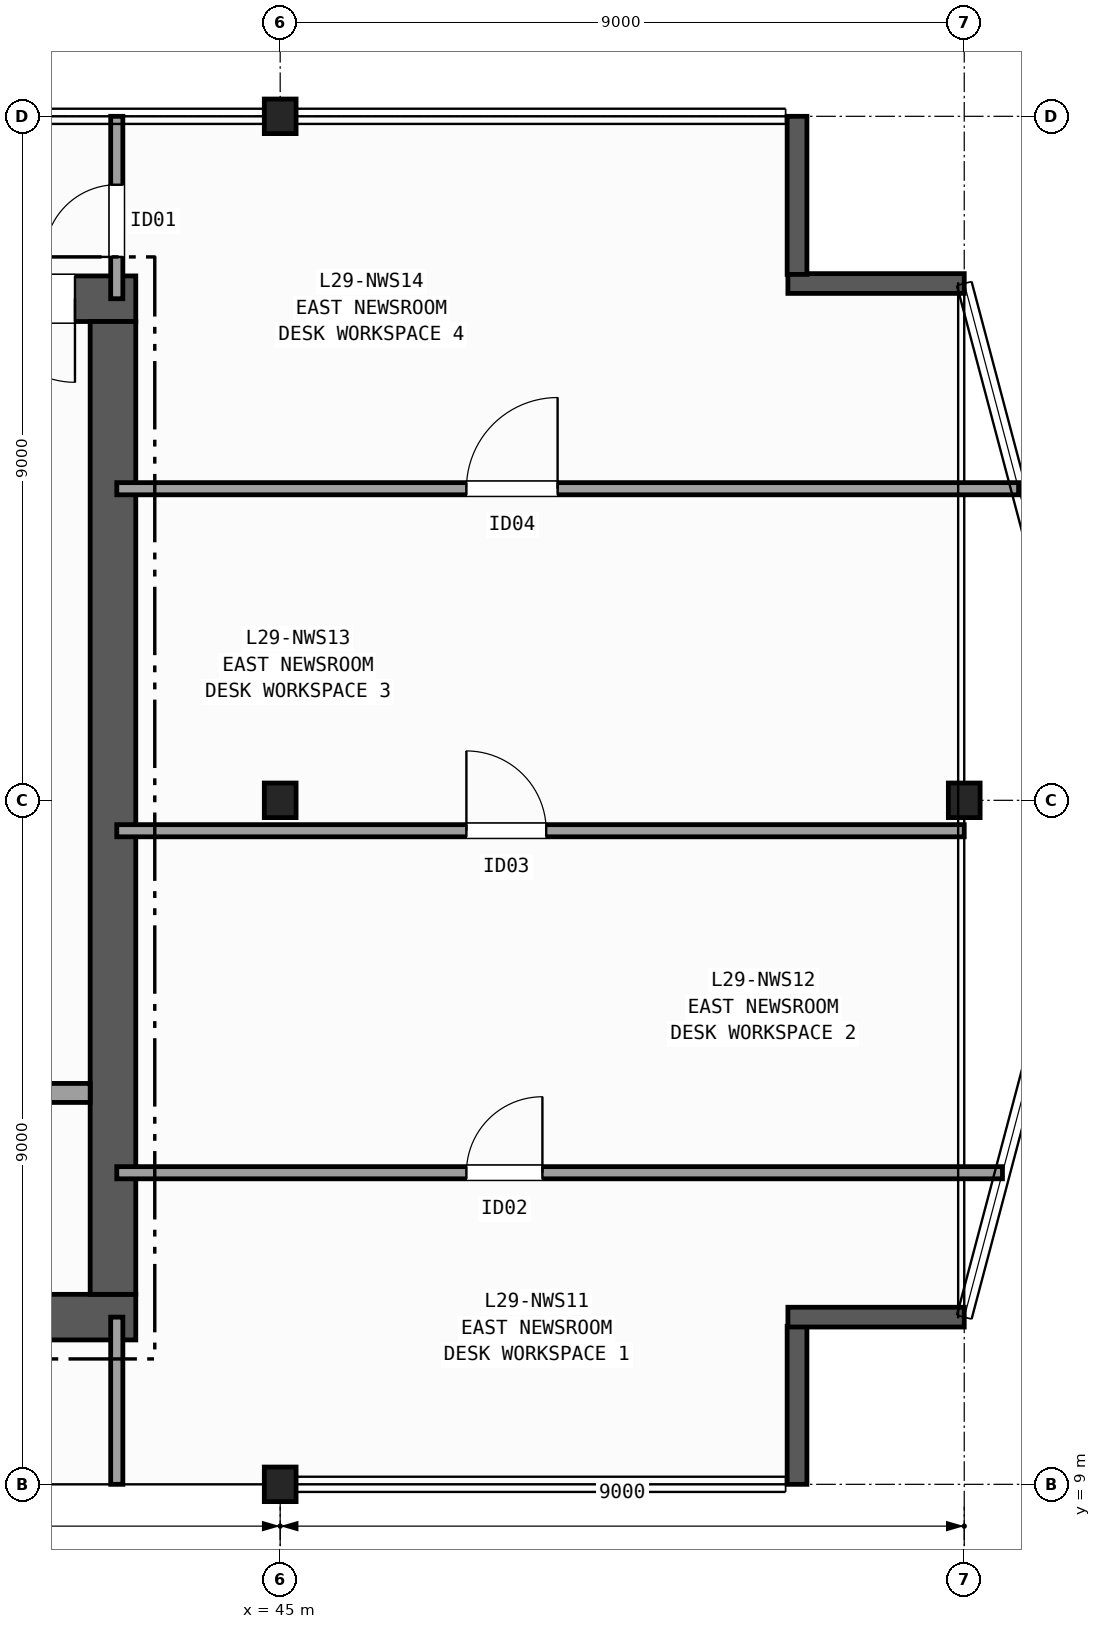
"""IFC4 building model, lengths in metres.
Left out: names, types, materials, properties, quantities, classifications, styles, units other than length and angle.
Written with IfcOpenShell. Run it as: python <this file> out.ifc"""

import sys

from ifc_helpers import new_model, si_unit, direction, frame, frame_2d, origin, origin_2d, place, context, subcontext, project, spatial, rectangle, i_section, extrude, element, fill, save


model = new_model("IFC4")
c1 = context("Model", 3, precision=1e-05, world=origin(), true_north=direction((0.0, 1.0)))
c2 = subcontext(c1, "Body", "Model", "MODEL_VIEW")
j1 = project(units=[si_unit("LENGTHUNIT", "METRE"), si_unit("PLANEANGLEUNIT", "RADIAN")], contexts=[c1])
p1 = place(None, origin())
s1 = spatial("IfcSite", under=j1, at=p1, CompositionType="ELEMENT")
p2 = place(p1, origin())
s2 = spatial("IfcBuilding", under=s1, at=p2, CompositionType="ELEMENT")
p3 = place(p2, frame((0.0, 0.0, 121.1)))
s3 = spatial("IfcBuildingStorey", under=s2, at=p3, CompositionType="ELEMENT", Elevation=121.1)
for number, where, z_axis, x_axis in (
    (1, (45.0, 9.0, 0.0), (0.0, 0.0, 1.0), (1.0, 0.0, 0.0)),
    (2, (45.0, 18.0, 0.0), (0.0, 0.0, 1.0), (1.0, 0.0, 0.0)),
    (3, (45.0, 27.0, 0.0), (0.0, 0.0, 1.0), (1.0, 0.0, 0.0)),
    (4, (54.0, 18.0, 0.0), (0.0, 0.0, 1.0), (1.0, 0.0, 0.0)),
):
    element("IfcColumn", number, at=place(p3, frame(where, z_axis=z_axis, x_axis=x_axis)), inside=s3, PredefinedType="COLUMN", context=c2, shape_type="SweptSolid", body=[
        extrude(i_section(OverallWidth=0.418, OverallDepth=0.455, WebThickness=0.042, FlangeThickness=0.068, FilletRadius=0.015, at=origin_2d()), origin(), (0.0, 0.0, 1.0), 3.7),
    ])
p4 = place(p3, frame((51.8, 9.0, 0.0), z_axis=(0.0, 0.0, 1.0), x_axis=(0.0, 1.0, 0.0)))
e5 = element("IfcWall", 5, at=p4, inside=s3, PredefinedType="SOLIDWALL", context=c2, shape_type="SweptSolid", body=[
    extrude(rectangle(XDim=2.08, YDim=0.26, at=frame_2d((1.04, 0.0))), origin(), (0.0, 0.0, 1.0), 3.42),
])
for number, where, z_axis, x_axis in (
    (6, (51.68, 11.2, 0.0), (0.0, 0.0, 1.0), (1.0, 0.0, 0.0)),
    (7, (54.0, 24.8, 0.0), (0.0, 0.0, 1.0), (-1.0, 0.0, 0.0)),
):
    element("IfcWall", number, at=place(p3, frame(where, z_axis=z_axis, x_axis=x_axis)), inside=s3, PredefinedType="SOLIDWALL", context=c2, shape_type="SweptSolid", body=[
        extrude(rectangle(XDim=2.32, YDim=0.26, at=frame_2d((1.16, 0.0))), origin(), (0.0, 0.0, 1.0), 3.42),
    ])
p5 = place(p3, frame((51.8, 24.92, 0.0), z_axis=(0.0, 0.0, 1.0), x_axis=(0.0, 1.0, 0.0)))
e8 = element("IfcWall", 8, at=p5, inside=s3, PredefinedType="SOLIDWALL", context=c2, shape_type="SweptSolid", body=[
    extrude(rectangle(XDim=2.08, YDim=0.26, at=frame_2d((1.04, 0.0))), origin(), (0.0, 0.0, 1.0), 3.42),
])
p6 = place(p3, frame((29.1, 11.2, 0.0), z_axis=(0.0, 0.0, 1.0), x_axis=(1.0, 0.0, 0.0)))
e9 = element("IfcWall", 9, at=p6, inside=s3, PredefinedType="SHEAR", context=c2, shape_type="SweptSolid", body=[
    extrude(rectangle(XDim=14.0, YDim=0.6, at=frame_2d((7.0, 0.0))), origin(), (0.0, 0.0, 1.0), 3.42),
])
p7 = place(p3, frame((43.1, 24.6, 0.0), z_axis=(0.0, 0.0, 1.0), x_axis=(-1.0, 0.0, 0.0)))
e10 = element("IfcWall", 10, at=p7, inside=s3, PredefinedType="SHEAR", context=c2, shape_type="SweptSolid", body=[
    extrude(rectangle(XDim=14.0, YDim=0.6, at=frame_2d((7.0, 0.0))), origin(), (0.0, 0.0, 1.0), 3.42),
])
p8 = place(p7, frame((0.8, 0.0, 0.0)))
e11 = element("IfcOpeningElement", 11, at=p8, cuts=e10, PredefinedType="OPENING", context=c2, shape_type="SweptSolid", body=[
    extrude(rectangle(XDim=1.1, YDim=2.15, at=frame_2d((0.55, 1.075))), frame((0.0, 0.31, 0.0), z_axis=(0.0, -1.0, 0.0), x_axis=(1.0, 0.0, 0.0)), (0.0, 0.0, 1.0), 0.62),
])
p9 = place(p7, frame((2.3, 0.0, 0.0)))
e12 = element("IfcOpeningElement", 12, at=p9, cuts=e10, PredefinedType="OPENING", context=c2, shape_type="SweptSolid", body=[
    extrude(rectangle(XDim=0.9, YDim=2.1, at=frame_2d((0.45, 1.05))), frame((0.0, 0.31, 0.0), z_axis=(0.0, -1.0, 0.0), x_axis=(1.0, 0.0, 0.0)), (0.0, 0.0, 1.0), 0.62),
])
p10 = place(p7, frame((3.6, 0.0, 0.0)))
e13 = element("IfcOpeningElement", 13, at=p10, cuts=e10, PredefinedType="OPENING", context=c2, shape_type="SweptSolid", body=[
    extrude(rectangle(XDim=0.9, YDim=2.1, at=frame_2d((0.45, 1.05))), frame((0.0, 0.31, 0.0), z_axis=(0.0, -1.0, 0.0), x_axis=(1.0, 0.0, 0.0)), (0.0, 0.0, 1.0), 0.62),
])
p11 = place(p7, frame((4.95, 0.0, 0.0)))
e14 = element("IfcOpeningElement", 14, at=p11, cuts=e10, PredefinedType="OPENING", context=c2, shape_type="SweptSolid", body=[
    extrude(rectangle(XDim=0.9, YDim=2.1, at=frame_2d((0.45, 1.05))), frame((0.0, 0.31, 0.0), z_axis=(0.0, -1.0, 0.0), x_axis=(1.0, 0.0, 0.0)), (0.0, 0.0, 1.0), 0.62),
])
p12 = place(p3, frame((42.8, 11.5, 0.0), z_axis=(0.0, 0.0, 1.0), x_axis=(0.0, 1.0, 0.0)))
e15 = element("IfcWall", 15, at=p12, inside=s3, PredefinedType="SHEAR", context=c2, shape_type="SweptSolid", body=[
    extrude(rectangle(XDim=12.8, YDim=0.6, at=frame_2d((6.4, 0.0))), origin(), (0.0, 0.0, 1.0), 3.42),
])
p13 = place(p3, frame((38.2, 14.15, 0.0), z_axis=(0.0, 0.0, 1.0), x_axis=(1.0, 0.0, 0.0)))
e16 = element("IfcWall", 16, at=p13, inside=s3, PredefinedType="PARTITIONING", context=c2, shape_type="SweptSolid", body=[
    extrude(rectangle(XDim=4.3, YDim=0.25, at=frame_2d((2.15, 0.0))), origin(), (0.0, 0.0, 1.0), 3.42),
])
p14 = place(p13, frame((0.925, 0.0, 0.0)))
e17 = element("IfcOpeningElement", 17, at=p14, cuts=e16, PredefinedType="OPENING", context=c2, shape_type="SweptSolid", body=[
    extrude(rectangle(XDim=1.15, YDim=2.15, at=frame_2d((0.575, 1.075))), frame((0.0, 0.135, 0.0), z_axis=(0.0, -1.0, 0.0), x_axis=(1.0, 0.0, 0.0)), (0.0, 0.0, 1.0), 0.27),
])
p15 = place(p3, frame((42.85, 9.0, 0.0), z_axis=(0.0, 0.0, 1.0), x_axis=(0.0, 1.0, 0.0)))
e18 = element("IfcWall", 18, at=p15, inside=s3, PredefinedType="PARTITIONING", context=c2, shape_type="SweptSolid", body=[
    extrude(rectangle(XDim=2.2, YDim=0.16, at=frame_2d((1.1, 0.0))), origin(), (0.0, 0.0, 1.0), 2.634),
])
p16 = place(p3, frame((42.85, 24.6, 0.0), z_axis=(0.0, 0.0, 1.0), x_axis=(0.0, 1.0, 0.0)))
e19 = element("IfcWall", 19, at=p16, inside=s3, PredefinedType="PARTITIONING", context=c2, shape_type="SweptSolid", body=[
    extrude(rectangle(XDim=2.4, YDim=0.16, at=frame_2d((1.2, 0.0))), origin(), (0.0, 0.0, 1.0), 2.634),
])
p17 = place(p16, frame((0.55, 0.0, 0.0)))
e20 = element("IfcOpeningElement", 20, at=p17, cuts=e19, PredefinedType="OPENING", context=c2, shape_type="SweptSolid", body=[
    extrude(rectangle(XDim=0.95, YDim=2.1, at=frame_2d((0.475, 1.05))), frame((0.0, 0.09, 0.0), z_axis=(0.0, -1.0, 0.0), x_axis=(1.0, 0.0, 0.0)), (0.0, 0.0, 1.0), 0.18),
])
p18 = place(p3, frame((42.85, 13.1, 0.0), z_axis=(0.0, 0.0, 1.0), x_axis=(1.0, 0.0, 0.0)))
e21 = element("IfcWall", 21, at=p18, inside=s3, PredefinedType="PARTITIONING", context=c2, shape_type="SweptSolid", body=[
    extrude(rectangle(XDim=11.653, YDim=0.16, at=frame_2d((5.826, 0.0))), origin(), (0.0, 0.0, 1.0), 3.42),
])
p19 = place(p18, frame((4.6, 0.0, 0.0)))
e22 = element("IfcOpeningElement", 22, at=p19, cuts=e21, PredefinedType="OPENING", context=c2, shape_type="SweptSolid", body=[
    extrude(rectangle(XDim=1.0, YDim=2.1, at=frame_2d((0.5, 1.05))), frame((0.0, 0.09, 0.0), z_axis=(0.0, -1.0, 0.0), x_axis=(1.0, 0.0, 0.0)), (0.0, 0.0, 1.0), 0.18),
])
p20 = place(p3, frame((42.85, 17.6, 0.0), z_axis=(0.0, 0.0, 1.0), x_axis=(1.0, 0.0, 0.0)))
e23 = element("IfcWall", 23, at=p20, inside=s3, PredefinedType="PARTITIONING", context=c2, shape_type="SweptSolid", body=[
    extrude(rectangle(XDim=11.15, YDim=0.16, at=frame_2d((5.575, 0.0))), origin(), (0.0, 0.0, 1.0), 3.42),
])
p21 = place(p20, frame((4.6, 0.0, 0.0)))
e24 = element("IfcOpeningElement", 24, at=p21, cuts=e23, PredefinedType="OPENING", context=c2, shape_type="SweptSolid", body=[
    extrude(rectangle(XDim=1.05, YDim=2.15, at=frame_2d((0.525, 1.075))), frame((0.0, 0.09, 0.0), z_axis=(0.0, -1.0, 0.0), x_axis=(1.0, 0.0, 0.0)), (0.0, 0.0, 1.0), 0.18),
])
p22 = place(p3, frame((42.85, 22.1, 0.0), z_axis=(0.0, 0.0, 1.0), x_axis=(1.0, 0.0, 0.0)))
e25 = element("IfcWall", 25, at=p22, inside=s3, PredefinedType="PARTITIONING", context=c2, shape_type="SweptSolid", body=[
    extrude(rectangle(XDim=11.865, YDim=0.16, at=frame_2d((5.933, 0.0))), origin(), (0.0, 0.0, 1.0), 3.42),
])
p23 = place(p22, frame((4.6, 0.0, 0.0)))
e26 = element("IfcOpeningElement", 26, at=p23, cuts=e25, PredefinedType="OPENING", context=c2, shape_type="SweptSolid", body=[
    extrude(rectangle(XDim=1.2, YDim=2.15, at=frame_2d((0.6, 1.075))), frame((0.0, 0.09, 0.0), z_axis=(0.0, -1.0, 0.0), x_axis=(1.0, 0.0, 0.0)), (0.0, 0.0, 1.0), 0.18),
])
p24 = place(p8, origin())
e27 = element("IfcDoor", 27, at=p24, inside=s3, OperationType="SINGLE_SWING_LEFT", PredefinedType="DOOR", context=c2, shape_type="SweptSolid", body=[
    extrude(rectangle(XDim=1.1, YDim=2.15, at=frame_2d((0.55, 1.075))), frame((0.0, 0.025, 0.0), z_axis=(0.0, -1.0, 0.0), x_axis=(1.0, 0.0, 0.0)), (0.0, 0.0, 1.0), 0.05),
])
fill(e11, e27)
p25 = place(p17, origin())
e28 = element("IfcDoor", 28, at=p25, inside=s3, OperationType="SINGLE_SWING_LEFT", PredefinedType="DOOR", context=c2, shape_type="SweptSolid", body=[
    extrude(rectangle(XDim=0.95, YDim=2.1, at=frame_2d((0.475, 1.05))), frame((0.0, 0.025, 0.0), z_axis=(0.0, -1.0, 0.0), x_axis=(1.0, 0.0, 0.0)), (0.0, 0.0, 1.0), 0.05),
])
fill(e20, e28)
p26 = place(p19, origin())
e29 = element("IfcDoor", 29, at=p26, inside=s3, OperationType="SINGLE_SWING_RIGHT", PredefinedType="DOOR", context=c2, shape_type="SweptSolid", body=[
    extrude(rectangle(XDim=1.0, YDim=2.1, at=frame_2d((0.5, 1.05))), frame((0.0, 0.025, 0.0), z_axis=(0.0, -1.0, 0.0), x_axis=(1.0, 0.0, 0.0)), (0.0, 0.0, 1.0), 0.05),
])
fill(e22, e29)
p27 = place(p21, origin())
e30 = element("IfcDoor", 30, at=p27, inside=s3, OperationType="SINGLE_SWING_LEFT", PredefinedType="DOOR", context=c2, shape_type="SweptSolid", body=[
    extrude(rectangle(XDim=1.05, YDim=2.15, at=frame_2d((0.525, 1.075))), frame((0.0, 0.025, 0.0), z_axis=(0.0, -1.0, 0.0), x_axis=(1.0, 0.0, 0.0)), (0.0, 0.0, 1.0), 0.05),
])
fill(e24, e30)
p28 = place(p23, origin())
e31 = element("IfcDoor", 31, at=p28, inside=s3, OperationType="SINGLE_SWING_RIGHT", PredefinedType="DOOR", context=c2, shape_type="SweptSolid", body=[
    extrude(rectangle(XDim=1.2, YDim=2.15, at=frame_2d((0.6, 1.075))), frame((0.0, 0.025, 0.0), z_axis=(0.0, -1.0, 0.0), x_axis=(1.0, 0.0, 0.0)), (0.0, 0.0, 1.0), 0.05),
])
fill(e26, e31)
save(model, sys.argv[1])
